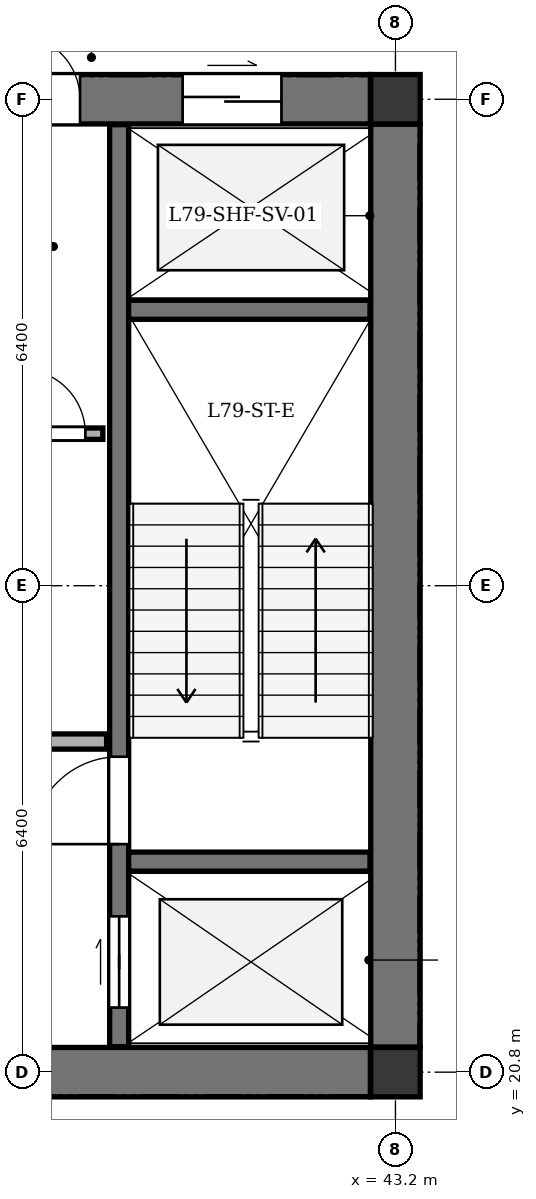
"""IFC4 building model, lengths in metres.
Left out: names, types, materials, properties, quantities, classifications, styles, units other than length and angle.
Written with IfcOpenShell. Run it as: python <this file> out.ifc"""

import sys

from ifc_helpers import new_model, si_unit, direction, frame, frame_2d, origin, origin_2d, place, context, subcontext, project, spatial, rectangle, extrude, element, fill, save


model = new_model("IFC4")
c1 = context("Model", 3, precision=1e-05, world=origin(), true_north=direction((0.0, 1.0)))
c2 = subcontext(c1, "Body", "Model", "MODEL_VIEW")
j1 = project(units=[si_unit("LENGTHUNIT", "METRE"), si_unit("PLANEANGLEUNIT", "RADIAN")], contexts=[c1])
p1 = place(None, origin())
s1 = spatial("IfcSite", under=j1, at=p1, CompositionType="ELEMENT")
p2 = place(p1, origin())
s2 = spatial("IfcBuilding", under=s1, at=p2, CompositionType="ELEMENT")
p3 = place(p2, frame((0.0, 0.0, 300.6)))
s3 = spatial("IfcBuildingStorey", under=s2, at=p3, CompositionType="ELEMENT", Elevation=300.6)
for number, where, z_axis, x_axis in (
    (1, (43.2, 20.8, 0.0), (0.0, 0.0, 1.0), (1.0, 0.0, 0.0)),
    (2, (43.2, 33.6, 0.0), (0.0, 0.0, 1.0), (1.0, 0.0, 0.0)),
):
    element("IfcColumn", number, at=place(p3, frame(where, z_axis=z_axis, x_axis=x_axis)), inside=s3, PredefinedType="COLUMN", context=c2, shape_type="SweptSolid", body=[
        extrude(rectangle(XDim=0.65, YDim=0.65, at=origin_2d()), origin(), (0.0, 0.0, 1.0), 4.2),
    ])
p4 = place(p3, frame((43.2, 21.13, 0.0), z_axis=(0.0, 0.0, 1.0), x_axis=(0.0, 1.0, 0.0)))
e3 = element("IfcWall", 3, at=p4, inside=s3, PredefinedType="SHEAR", context=c2, shape_type="SweptSolid", body=[
    extrude(rectangle(XDim=12.14, YDim=0.65, at=frame_2d((6.07, 0.0))), origin(), (0.0, 0.0, 1.0), 3.92),
])
p5 = place(p3, frame((35.53, 20.8, 0.0), z_axis=(0.0, 0.0, 1.0), x_axis=(1.0, 0.0, 0.0)))
e4 = element("IfcWall", 4, at=p5, inside=s3, PredefinedType="SHEAR", context=c2, shape_type="SweptSolid", body=[
    extrude(rectangle(XDim=7.34, YDim=0.65, at=frame_2d((3.67, 0.0))), origin(), (0.0, 0.0, 1.0), 3.92),
])
p6 = place(p3, frame((35.53, 33.6, 0.0), z_axis=(0.0, 0.0, 1.0), x_axis=(1.0, 0.0, 0.0)))
e5 = element("IfcWall", 5, at=p6, inside=s3, PredefinedType="SHEAR", context=c2, shape_type="SweptSolid", body=[
    extrude(rectangle(XDim=7.34, YDim=0.65, at=frame_2d((3.67, 0.0))), origin(), (0.0, 0.0, 1.0), 3.92),
])
p7 = place(p6, frame((4.87, 0.0, 0.0)))
e6 = element("IfcOpeningElement", 6, at=p7, cuts=e5, PredefinedType="OPENING", context=c2, shape_type="SweptSolid", body=[
    extrude(rectangle(XDim=1.3, YDim=2.15, at=frame_2d((0.65, 1.075))), frame((0.0, 0.335, 0.0), z_axis=(0.0, -1.0, 0.0), x_axis=(1.0, 0.0, 0.0)), (0.0, 0.0, 1.0), 0.67),
])
p8 = place(p6, frame((2.67, 0.0, 0.0)))
e7 = element("IfcOpeningElement", 7, at=p8, cuts=e5, PredefinedType="OPENING", context=c2, shape_type="SweptSolid", body=[
    extrude(rectangle(XDim=0.85, YDim=2.02, at=frame_2d((0.425, 1.01))), frame((0.0, 0.335, 0.0), z_axis=(0.0, -1.0, 0.0), x_axis=(1.0, 0.0, 0.0)), (0.0, 0.0, 1.0), 0.67),
])
p9 = place(p3, frame((39.565, 21.135, 0.0), z_axis=(0.0, 0.0, 1.0), x_axis=(0.0, 1.0, 0.0)))
e8 = element("IfcWall", 8, at=p9, inside=s3, PredefinedType="SHEAR", context=c2, shape_type="SweptSolid", body=[
    extrude(rectangle(XDim=12.13, YDim=0.25, at=frame_2d((6.065, 0.0))), origin(), (0.0, 0.0, 1.0), 3.92),
])
p10 = place(p9, frame((0.515, 0.0, 0.0)))
e9 = element("IfcOpeningElement", 9, at=p10, cuts=e8, PredefinedType="OPENING", context=c2, shape_type="SweptSolid", body=[
    extrude(rectangle(XDim=1.2, YDim=2.15, at=frame_2d((0.6, 1.075))), frame((0.0, 0.135, 0.0), z_axis=(0.0, -1.0, 0.0), x_axis=(1.0, 0.0, 0.0)), (0.0, 0.0, 1.0), 0.27),
])
p11 = place(p9, frame((2.665, 0.0, 0.0)))
e10 = element("IfcOpeningElement", 10, at=p11, cuts=e8, PredefinedType="OPENING", context=c2, shape_type="SweptSolid", body=[
    extrude(rectangle(XDim=1.15, YDim=2.15, at=frame_2d((0.575, 1.075))), frame((0.0, 0.135, 0.0), z_axis=(0.0, -1.0, 0.0), x_axis=(1.0, 0.0, 0.0)), (0.0, 0.0, 1.0), 0.27),
])
for number, where, z_axis, x_axis in (
    (11, (39.69, 23.57, 0.0), (0.0, 0.0, 1.0), (1.0, 0.0, 0.0)),
    (12, (39.69, 30.83, 0.0), (0.0, 0.0, 1.0), (1.0, 0.0, 0.0)),
):
    element("IfcWall", number, at=place(p3, frame(where, z_axis=z_axis, x_axis=x_axis)), inside=s3, PredefinedType="SHEAR", context=c2, shape_type="SweptSolid", body=[
        extrude(rectangle(XDim=3.175, YDim=0.25, at=frame_2d((1.587, 0.0))), origin(), (0.0, 0.0, 1.0), 3.92),
    ])
p12 = place(p3, frame((35.55, 25.15, 0.0), z_axis=(0.0, 0.0, 1.0), x_axis=(1.0, 0.0, 0.0)))
e13 = element("IfcWall", 13, at=p12, inside=s3, PredefinedType="SOLIDWALL", context=c2, shape_type="SweptSolid", body=[
    extrude(rectangle(XDim=3.85, YDim=0.2, at=frame_2d((1.925, 0.0))), origin(), (0.0, 0.0, 1.0), 3.92),
])
p13 = place(p3, frame((38.05, 29.2, 0.0), z_axis=(0.0, 0.0, 1.0), x_axis=(1.0, 0.0, 0.0)))
e14 = element("IfcWall", 14, at=p13, inside=s3, PredefinedType="PARTITIONING", context=c2, shape_type="SweptSolid", body=[
    extrude(rectangle(XDim=1.3, YDim=0.15, at=frame_2d((0.65, 0.0))), origin(), (0.0, 0.0, 1.0), 3.92),
])
p14 = place(p13, frame((0.22, 0.0, 0.0)))
e15 = element("IfcOpeningElement", 15, at=p14, cuts=e14, PredefinedType="OPENING", context=c2, shape_type="SweptSolid", body=[
    extrude(rectangle(XDim=0.85, YDim=2.02, at=frame_2d((0.425, 1.01))), frame((0.0, 0.085, 0.0), z_axis=(0.0, -1.0, 0.0), x_axis=(1.0, 0.0, 0.0)), (0.0, 0.0, 1.0), 0.17),
])
p15 = place(p7, origin())
e16 = element("IfcDoor", 16, at=p15, inside=s3, OperationType="DOUBLE_DOOR_SLIDING", PredefinedType="DOOR", context=c2, shape_type="SweptSolid", body=[
    extrude(rectangle(XDim=1.3, YDim=2.15, at=frame_2d((0.65, 1.075))), frame((0.0, 0.025, 0.0), z_axis=(0.0, -1.0, 0.0), x_axis=(1.0, 0.0, 0.0)), (0.0, 0.0, 1.0), 0.05),
])
fill(e6, e16)
p16 = place(p8, origin())
e17 = element("IfcDoor", 17, at=p16, inside=s3, OperationType="SINGLE_SWING_LEFT", PredefinedType="DOOR", context=c2, shape_type="SweptSolid", body=[
    extrude(rectangle(XDim=0.85, YDim=2.02, at=frame_2d((0.425, 1.01))), frame((0.0, 0.025, 0.0), z_axis=(0.0, -1.0, 0.0), x_axis=(1.0, 0.0, 0.0)), (0.0, 0.0, 1.0), 0.05),
])
fill(e7, e17)
p17 = place(p10, origin())
e18 = element("IfcDoor", 18, at=p17, inside=s3, OperationType="DOUBLE_DOOR_SLIDING", PredefinedType="DOOR", context=c2, shape_type="SweptSolid", body=[
    extrude(rectangle(XDim=1.2, YDim=2.15, at=frame_2d((0.6, 1.075))), frame((0.0, 0.025, 0.0), z_axis=(0.0, -1.0, 0.0), x_axis=(1.0, 0.0, 0.0)), (0.0, 0.0, 1.0), 0.05),
])
fill(e9, e18)
p18 = place(p11, origin())
e19 = element("IfcDoor", 19, at=p18, inside=s3, OperationType="SINGLE_SWING_LEFT", PredefinedType="DOOR", context=c2, shape_type="SweptSolid", body=[
    extrude(rectangle(XDim=1.15, YDim=2.15, at=frame_2d((0.575, 1.075))), frame((0.0, 0.025, 0.0), z_axis=(0.0, -1.0, 0.0), x_axis=(1.0, 0.0, 0.0)), (0.0, 0.0, 1.0), 0.05),
])
fill(e10, e19)
p19 = place(p14, origin())
e20 = element("IfcDoor", 20, at=p19, inside=s3, OperationType="SINGLE_SWING_LEFT", PredefinedType="DOOR", context=c2, shape_type="SweptSolid", body=[
    extrude(rectangle(XDim=0.85, YDim=2.02, at=frame_2d((0.425, 1.01))), frame((0.0, 0.025, 0.0), z_axis=(0.0, -1.0, 0.0), x_axis=(1.0, 0.0, 0.0)), (0.0, 0.0, 1.0), 0.05),
])
fill(e15, e20)
save(model, sys.argv[1])
